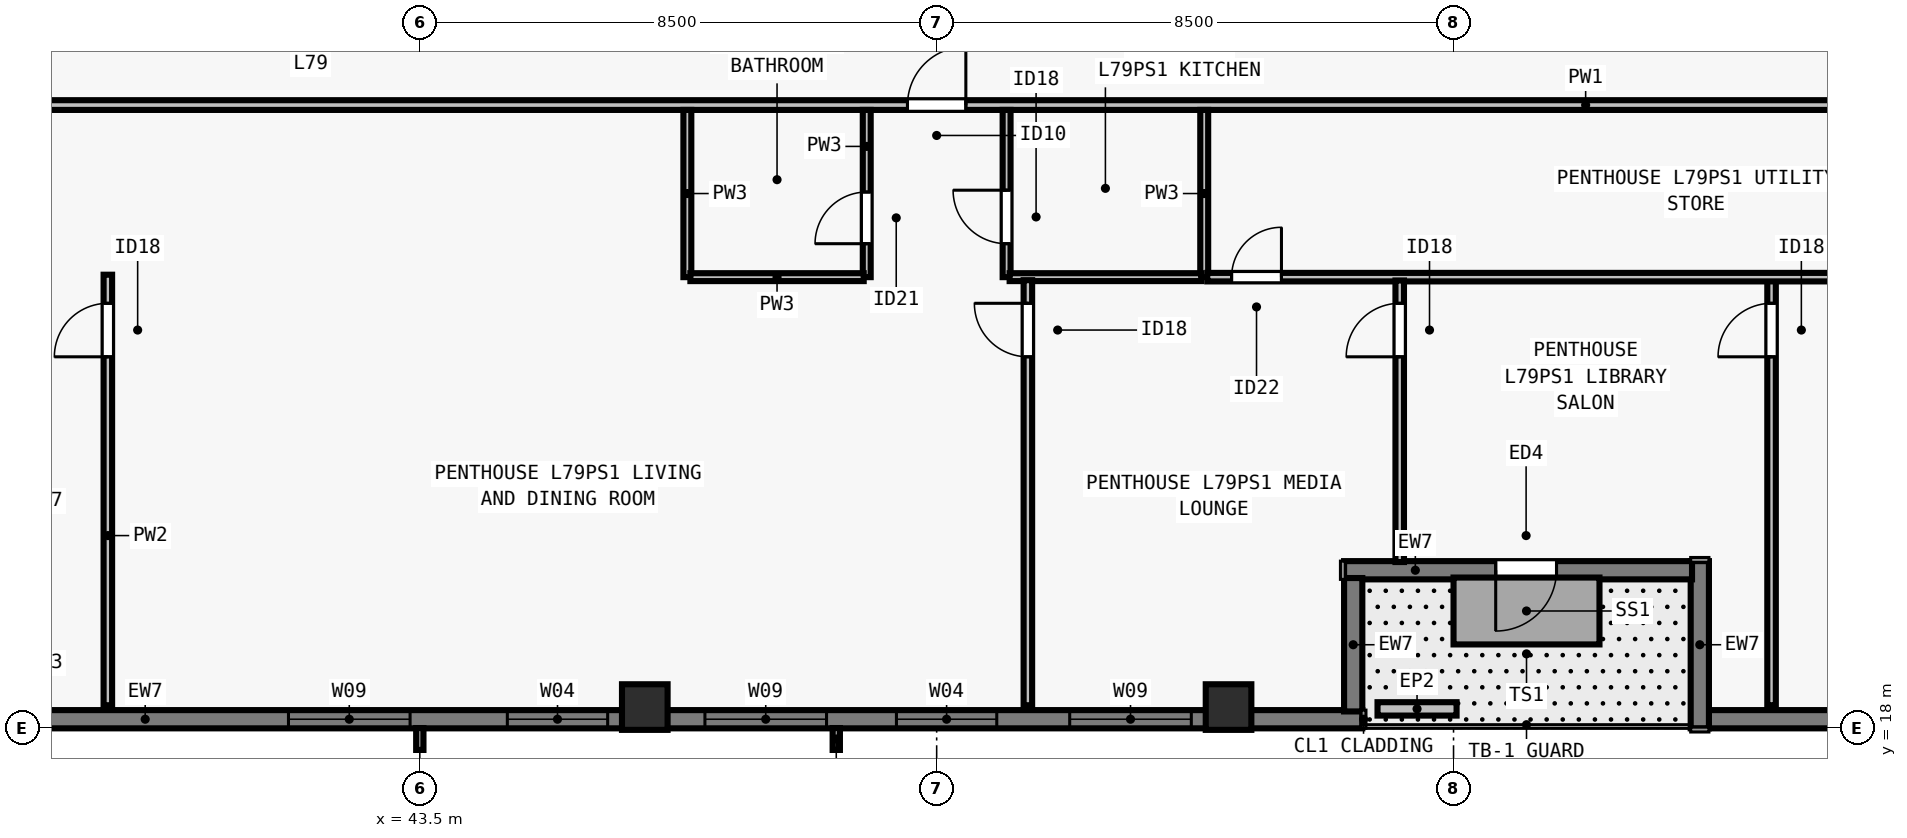
"""IFC4 building model, lengths in metres.
Left out: names, types, materials, properties, quantities, classifications, styles, units other than length and angle.
Written with IfcOpenShell. Run it as: python <this file> out.ifc"""

import sys

from ifc_helpers import new_model, si_unit, direction, frame, frame_2d, origin, origin_2d, place, context, subcontext, project, spatial, rectangle, extrude, element, fill, save


model = new_model("IFC4")
c1 = context("Model", 3, precision=1e-05, world=origin(), true_north=direction((0.0, 1.0)))
c2 = subcontext(c1, "Body", "Model", "MODEL_VIEW")
j1 = project(units=[si_unit("LENGTHUNIT", "METRE"), si_unit("PLANEANGLEUNIT", "RADIAN")], contexts=[c1])
p1 = place(None, origin())
s1 = spatial("IfcSite", under=j1, at=p1, CompositionType="ELEMENT")
p2 = place(p1, origin())
s2 = spatial("IfcBuilding", under=s1, at=p2, CompositionType="ELEMENT")
p3 = place(p2, frame((0.0, 0.0, 287.5)))
s3 = spatial("IfcBuildingStorey", under=s2, at=p3, CompositionType="ELEMENT", Elevation=287.5)
for number, where, z_axis, x_axis in (
    (1, (47.2, 18.35, 0.0), (0.0, 0.0, 1.0), (1.0, 0.0, 0.0)),
    (2, (56.8, 18.35, 0.0), (0.0, 0.0, 1.0), (1.0, 0.0, 0.0)),
):
    element("IfcColumn", number, at=place(p3, frame(where, z_axis=z_axis, x_axis=x_axis)), inside=s3, PredefinedType="COLUMN", context=c2, shape_type="SweptSolid", body=[
        extrude(rectangle(XDim=0.75, YDim=0.75, at=origin_2d()), origin(), (0.0, 0.0, 1.0), 3.5),
    ])
p4 = place(p3, frame((59.0, 18.15, 0.0), z_axis=(0.0, 0.0, 1.0), x_axis=(-1.0, 0.0, 0.0)))
e3 = element("IfcWall", 3, at=p4, inside=s3, PredefinedType="SOLIDWALL", context=c2, shape_type="SweptSolid", body=[
    extrude(rectangle(XDim=22.222, YDim=0.3, at=frame_2d((11.111, 0.0))), origin(), (0.0, 0.0, 1.0), 3.29),
])
p5 = place(p4, frame((2.812, 0.0, 0.8)))
e4 = element("IfcOpeningElement", 4, at=p5, cuts=e3, PredefinedType="OPENING", context=c2, shape_type="SweptSolid", body=[
    extrude(rectangle(XDim=2.0, YDim=1.758, at=frame_2d((1.0, 0.879))), frame((0.0, 0.16, 0.0), z_axis=(0.0, -1.0, 0.0), x_axis=(1.0, 0.0, 0.0)), (0.0, 0.0, 1.0), 0.32),
])
p6 = place(p4, frame((6.012, 0.0, 0.8)))
e5 = element("IfcOpeningElement", 5, at=p6, cuts=e3, PredefinedType="OPENING", context=c2, shape_type="SweptSolid", body=[
    extrude(rectangle(XDim=1.65, YDim=1.758, at=frame_2d((0.825, 0.879))), frame((0.0, 0.16, 0.0), z_axis=(0.0, -1.0, 0.0), x_axis=(1.0, 0.0, 0.0)), (0.0, 0.0, 1.0), 0.32),
])
p7 = place(p4, frame((8.811, 0.0, 0.8)))
e6 = element("IfcOpeningElement", 6, at=p7, cuts=e3, PredefinedType="OPENING", context=c2, shape_type="SweptSolid", body=[
    extrude(rectangle(XDim=2.0, YDim=1.758, at=frame_2d((1.0, 0.879))), frame((0.0, 0.16, 0.0), z_axis=(0.0, -1.0, 0.0), x_axis=(1.0, 0.0, 0.0)), (0.0, 0.0, 1.0), 0.32),
])
p8 = place(p4, frame((12.41, 0.0, 0.8)))
e7 = element("IfcOpeningElement", 7, at=p8, cuts=e3, PredefinedType="OPENING", context=c2, shape_type="SweptSolid", body=[
    extrude(rectangle(XDim=1.65, YDim=1.758, at=frame_2d((0.825, 0.879))), frame((0.0, 0.16, 0.0), z_axis=(0.0, -1.0, 0.0), x_axis=(1.0, 0.0, 0.0)), (0.0, 0.0, 1.0), 0.32),
])
p9 = place(p4, frame((15.66, 0.0, 0.8)))
e8 = element("IfcOpeningElement", 8, at=p9, cuts=e3, PredefinedType="OPENING", context=c2, shape_type="SweptSolid", body=[
    extrude(rectangle(XDim=2.0, YDim=1.758, at=frame_2d((1.0, 0.879))), frame((0.0, 0.16, 0.0), z_axis=(0.0, -1.0, 0.0), x_axis=(1.0, 0.0, 0.0)), (0.0, 0.0, 1.0), 0.32),
])
p10 = place(p3, frame((67.5, 18.15, 0.0), z_axis=(0.0, 0.0, 1.0), x_axis=(-1.0, 0.0, 0.0)))
e9 = element("IfcWall", 9, at=p10, inside=s3, PredefinedType="SOLIDWALL", context=c2, shape_type="SweptSolid", body=[
    extrude(rectangle(XDim=2.822, YDim=0.3, at=frame_2d((1.411, 0.0))), origin(), (0.0, 0.0, 1.0), 3.29),
])
p11 = place(p3, frame((64.55, 18.0, 0.0), z_axis=(0.0, 0.0, 1.0), x_axis=(0.0, 1.0, 0.0)))
e10 = element("IfcWall", 10, at=p11, inside=s3, PredefinedType="SOLIDWALL", context=c2, shape_type="SweptSolid", body=[
    extrude(rectangle(XDim=2.75, YDim=0.3, at=frame_2d((1.375, 0.0))), origin(), (0.0, 0.0, 1.0), 3.29),
])
p12 = place(p3, frame((64.422, 20.6, 0.0), z_axis=(0.0, 0.0, 1.0), x_axis=(-1.0, 0.0, 0.0)))
e11 = element("IfcWall", 11, at=p12, inside=s3, PredefinedType="SOLIDWALL", context=c2, shape_type="SweptSolid", body=[
    extrude(rectangle(XDim=5.722, YDim=0.3, at=frame_2d((2.861, 0.0))), origin(), (0.0, 0.0, 1.0), 3.29),
])
p13 = place(p12, frame((2.229, 0.0, 0.0)))
e12 = element("IfcOpeningElement", 12, at=p13, cuts=e11, PredefinedType="OPENING", context=c2, shape_type="SweptSolid", body=[
    extrude(rectangle(XDim=1.0, YDim=2.15, at=frame_2d((0.5, 1.075))), frame((0.0, 0.16, 0.0), z_axis=(0.0, -1.0, 0.0), x_axis=(1.0, 0.0, 0.0)), (0.0, 0.0, 1.0), 0.32),
])
p14 = place(p3, frame((58.85, 20.472, 0.0), z_axis=(0.0, 0.0, 1.0), x_axis=(0.0, -1.0, 0.0)))
e13 = element("IfcWall", 13, at=p14, inside=s3, PredefinedType="SOLIDWALL", context=c2, shape_type="SweptSolid", body=[
    extrude(rectangle(XDim=2.194, YDim=0.3, at=frame_2d((1.097, 0.0))), origin(), (0.0, 0.0, 1.0), 3.29),
])
p15 = place(p3, frame((59.25, 18.32, 0.0), z_axis=(0.0, 0.0, 1.0), x_axis=(1.0, 0.0, 0.0)))
e14 = element("IfcWall", 14, at=p15, inside=s3, PredefinedType="PARAPET", context=c2, shape_type="SweptSolid", body=[
    extrude(rectangle(XDim=1.3, YDim=0.22, at=frame_2d((0.65, 0.0))), origin(), (0.0, 0.0, 1.0), 0.55),
])
p16 = place(p3, frame((31.285, 28.25, 0.0), z_axis=(0.0, 0.0, 1.0), x_axis=(1.0, 0.0, 0.0)))
e15 = element("IfcWall", 15, at=p16, inside=s3, PredefinedType="PARTITIONING", context=c2, shape_type="SweptSolid", body=[
    extrude(rectangle(XDim=41.43, YDim=0.16, at=frame_2d((20.715, 0.0))), origin(), (0.0, 0.0, 1.0), 3.009),
])
p17 = place(p16, frame((20.235, 0.0, 0.0)))
e16 = element("IfcOpeningElement", 16, at=p17, cuts=e15, PredefinedType="OPENING", context=c2, shape_type="SweptSolid", body=[
    extrude(rectangle(XDim=0.96, YDim=2.18, at=frame_2d((0.48, 1.09))), frame((0.0, 0.09, 0.0), z_axis=(0.0, -1.0, 0.0), x_axis=(1.0, 0.0, 0.0)), (0.0, 0.0, 1.0), 0.18),
])
p18 = place(p3, frame((47.9, 25.42, 0.0), z_axis=(0.0, 0.0, 1.0), x_axis=(0.0, 1.0, 0.0)))
e17 = element("IfcWall", 17, at=p18, inside=s3, PredefinedType="PLUMBINGWALL", context=c2, shape_type="SweptSolid", body=[
    extrude(rectangle(XDim=2.75, YDim=0.13, at=frame_2d((1.375, 0.0))), origin(), (0.0, 0.0, 1.0), 3.29),
])
p19 = place(p3, frame((50.85, 25.42, 0.0), z_axis=(0.0, 0.0, 1.0), x_axis=(0.0, 1.0, 0.0)))
e18 = element("IfcWall", 18, at=p19, inside=s3, PredefinedType="PLUMBINGWALL", context=c2, shape_type="SweptSolid", body=[
    extrude(rectangle(XDim=2.75, YDim=0.13, at=frame_2d((1.375, 0.0))), origin(), (0.0, 0.0, 1.0), 3.29),
])
p20 = place(p19, frame((0.55, 0.0, 0.0)))
e19 = element("IfcOpeningElement", 19, at=p20, cuts=e18, PredefinedType="OPENING", context=c2, shape_type="SweptSolid", body=[
    extrude(rectangle(XDim=0.85, YDim=2.08, at=frame_2d((0.425, 1.04))), frame((0.0, 0.075, 0.0), z_axis=(0.0, -1.0, 0.0), x_axis=(1.0, 0.0, 0.0)), (0.0, 0.0, 1.0), 0.15),
])
p21 = place(p3, frame((47.95, 25.42, 0.0), z_axis=(0.0, 0.0, 1.0), x_axis=(1.0, 0.0, 0.0)))
e20 = element("IfcWall", 20, at=p21, inside=s3, PredefinedType="PLUMBINGWALL", context=c2, shape_type="SweptSolid", body=[
    extrude(rectangle(XDim=2.85, YDim=0.13, at=frame_2d((1.425, 0.0))), origin(), (0.0, 0.0, 1.0), 3.29),
])
p22 = place(p3, frame((56.4, 25.42, 0.0), z_axis=(0.0, 0.0, 1.0), x_axis=(0.0, 1.0, 0.0)))
e21 = element("IfcWall", 21, at=p22, inside=s3, PredefinedType="PLUMBINGWALL", context=c2, shape_type="SweptSolid", body=[
    extrude(rectangle(XDim=2.75, YDim=0.13, at=frame_2d((1.375, 0.0))), origin(), (0.0, 0.0, 1.0), 3.29),
])
p23 = place(p3, frame((53.15, 25.42, 0.0), z_axis=(0.0, 0.0, 1.0), x_axis=(0.0, 1.0, 0.0)))
e22 = element("IfcWall", 22, at=p23, inside=s3, PredefinedType="PLUMBINGWALL", context=c2, shape_type="SweptSolid", body=[
    extrude(rectangle(XDim=2.75, YDim=0.13, at=frame_2d((1.375, 0.0))), origin(), (0.0, 0.0, 1.0), 3.009),
])
p24 = place(p23, frame((0.55, 0.0, 0.0)))
e23 = element("IfcOpeningElement", 23, at=p24, cuts=e22, PredefinedType="OPENING", context=c2, shape_type="SweptSolid", body=[
    extrude(rectangle(XDim=0.88, YDim=2.1, at=frame_2d((0.44, 1.05))), frame((0.0, 0.075, 0.0), z_axis=(0.0, -1.0, 0.0), x_axis=(1.0, 0.0, 0.0)), (0.0, 0.0, 1.0), 0.15),
])
p25 = place(p3, frame((53.2, 25.42, 0.0), z_axis=(0.0, 0.0, 1.0), x_axis=(1.0, 0.0, 0.0)))
e24 = element("IfcWall", 24, at=p25, inside=s3, PredefinedType="PLUMBINGWALL", context=c2, shape_type="SweptSolid", body=[
    extrude(rectangle(XDim=3.15, YDim=0.13, at=frame_2d((1.575, 0.0))), origin(), (0.0, 0.0, 1.0), 3.29),
])
p26 = place(p3, frame((38.37, 18.38, 0.0), z_axis=(0.0, 0.0, 1.0), x_axis=(0.0, 1.0, 0.0)))
e25 = element("IfcWall", 25, at=p26, inside=s3, PredefinedType="PARTITIONING", context=c2, shape_type="SweptSolid", body=[
    extrude(rectangle(XDim=7.08, YDim=0.14, at=frame_2d((3.54, 0.0))), origin(), (0.0, 0.0, 1.0), 2.653),
])
p27 = place(p26, frame((5.73, 0.0, 0.0)))
e26 = element("IfcOpeningElement", 26, at=p27, cuts=e25, PredefinedType="OPENING", context=c2, shape_type="SweptSolid", body=[
    extrude(rectangle(XDim=0.88, YDim=2.1, at=frame_2d((0.44, 1.05))), frame((0.0, 0.08, 0.0), z_axis=(0.0, -1.0, 0.0), x_axis=(1.0, 0.0, 0.0)), (0.0, 0.0, 1.0), 0.16),
])
p28 = place(p3, frame((65.73, 18.38, 0.0), z_axis=(0.0, 0.0, 1.0), x_axis=(0.0, 1.0, 0.0)))
e27 = element("IfcWall", 27, at=p28, inside=s3, PredefinedType="PARTITIONING", context=c2, shape_type="SweptSolid", body=[
    extrude(rectangle(XDim=7.08, YDim=0.14, at=frame_2d((3.54, 0.0))), origin(), (0.0, 0.0, 1.0), 2.653),
])
p29 = place(p28, frame((5.73, 0.0, 0.0)))
e28 = element("IfcOpeningElement", 28, at=p29, cuts=e27, PredefinedType="OPENING", context=c2, shape_type="SweptSolid", body=[
    extrude(rectangle(XDim=0.88, YDim=2.1, at=frame_2d((0.44, 1.05))), frame((0.0, 0.08, 0.0), z_axis=(0.0, -1.0, 0.0), x_axis=(1.0, 0.0, 0.0)), (0.0, 0.0, 1.0), 0.16),
])
p30 = place(p3, frame((56.45, 25.42, 0.0), z_axis=(0.0, 0.0, 1.0), x_axis=(1.0, 0.0, 0.0)))
e29 = element("IfcWall", 29, at=p30, inside=s3, PredefinedType="PARTITIONING", context=c2, shape_type="SweptSolid", body=[
    extrude(rectangle(XDim=16.18, YDim=0.14, at=frame_2d((8.09, 0.0))), origin(), (0.0, 0.0, 1.0), 3.009),
])
p31 = place(p30, frame((0.4, 0.0, 0.0)))
e30 = element("IfcOpeningElement", 30, at=p31, cuts=e29, PredefinedType="OPENING", context=c2, shape_type="SweptSolid", body=[
    extrude(rectangle(XDim=0.82, YDim=2.1, at=frame_2d((0.41, 1.05))), frame((0.0, 0.08, 0.0), z_axis=(0.0, -1.0, 0.0), x_axis=(1.0, 0.0, 0.0)), (0.0, 0.0, 1.0), 0.16),
])
p32 = place(p3, frame((53.5, 18.38, 0.0), z_axis=(0.0, 0.0, 1.0), x_axis=(0.0, 1.0, 0.0)))
e31 = element("IfcWall", 31, at=p32, inside=s3, PredefinedType="PARTITIONING", context=c2, shape_type="SweptSolid", body=[
    extrude(rectangle(XDim=6.99, YDim=0.14, at=frame_2d((3.495, 0.0))), origin(), (0.0, 0.0, 1.0), 3.29),
])
p33 = place(p32, frame((5.73, 0.0, 0.0)))
e32 = element("IfcOpeningElement", 32, at=p33, cuts=e31, PredefinedType="OPENING", context=c2, shape_type="SweptSolid", body=[
    extrude(rectangle(XDim=0.88, YDim=2.1, at=frame_2d((0.44, 1.05))), frame((0.0, 0.08, 0.0), z_axis=(0.0, -1.0, 0.0), x_axis=(1.0, 0.0, 0.0)), (0.0, 0.0, 1.0), 0.16),
])
p34 = place(p3, frame((59.615, 20.735, 0.0), z_axis=(0.0, 0.0, 1.0), x_axis=(0.0, 1.0, 0.0)))
e33 = element("IfcWall", 33, at=p34, inside=s3, PredefinedType="PARTITIONING", context=c2, shape_type="SweptSolid", body=[
    extrude(rectangle(XDim=4.63, YDim=0.14, at=frame_2d((2.315, 0.0))), origin(), (0.0, 0.0, 1.0), 3.29),
])
p35 = place(p34, frame((3.375, 0.0, 0.0)))
e34 = element("IfcOpeningElement", 34, at=p35, cuts=e33, PredefinedType="OPENING", context=c2, shape_type="SweptSolid", body=[
    extrude(rectangle(XDim=0.88, YDim=2.1, at=frame_2d((0.44, 1.05))), frame((0.0, 0.08, 0.0), z_axis=(0.0, -1.0, 0.0), x_axis=(1.0, 0.0, 0.0)), (0.0, 0.0, 1.0), 0.16),
])
p36 = place(p5, origin())
e35 = element("IfcWindow", 35, at=p36, inside=s3, PartitioningType="SINGLE_PANEL", PredefinedType="WINDOW", context=c2, shape_type="SweptSolid", body=[
    extrude(rectangle(XDim=2.0, YDim=1.758, at=frame_2d((1.0, 0.879))), frame((0.0, -0.05, 0.0), z_axis=(0.0, -1.0, 0.0), x_axis=(1.0, 0.0, 0.0)), (0.0, 0.0, 1.0), 0.06),
])
fill(e4, e35)
p37 = place(p6, origin())
e36 = element("IfcWindow", 36, at=p37, inside=s3, PartitioningType="SINGLE_PANEL", PredefinedType="WINDOW", context=c2, shape_type="SweptSolid", body=[
    extrude(rectangle(XDim=1.65, YDim=1.758, at=frame_2d((0.825, 0.879))), frame((0.0, -0.05, 0.0), z_axis=(0.0, -1.0, 0.0), x_axis=(1.0, 0.0, 0.0)), (0.0, 0.0, 1.0), 0.06),
])
fill(e5, e36)
p38 = place(p7, origin())
e37 = element("IfcWindow", 37, at=p38, inside=s3, PartitioningType="SINGLE_PANEL", PredefinedType="WINDOW", context=c2, shape_type="SweptSolid", body=[
    extrude(rectangle(XDim=2.0, YDim=1.758, at=frame_2d((1.0, 0.879))), frame((0.0, -0.05, 0.0), z_axis=(0.0, -1.0, 0.0), x_axis=(1.0, 0.0, 0.0)), (0.0, 0.0, 1.0), 0.06),
])
fill(e6, e37)
p39 = place(p8, origin())
e38 = element("IfcWindow", 38, at=p39, inside=s3, PartitioningType="SINGLE_PANEL", PredefinedType="WINDOW", context=c2, shape_type="SweptSolid", body=[
    extrude(rectangle(XDim=1.65, YDim=1.758, at=frame_2d((0.825, 0.879))), frame((0.0, -0.05, 0.0), z_axis=(0.0, -1.0, 0.0), x_axis=(1.0, 0.0, 0.0)), (0.0, 0.0, 1.0), 0.06),
])
fill(e7, e38)
p40 = place(p9, origin())
e39 = element("IfcWindow", 39, at=p40, inside=s3, PartitioningType="SINGLE_PANEL", PredefinedType="WINDOW", context=c2, shape_type="SweptSolid", body=[
    extrude(rectangle(XDim=2.0, YDim=1.758, at=frame_2d((1.0, 0.879))), frame((0.0, -0.05, 0.0), z_axis=(0.0, -1.0, 0.0), x_axis=(1.0, 0.0, 0.0)), (0.0, 0.0, 1.0), 0.06),
])
fill(e8, e39)
p41 = place(p13, origin())
e40 = element("IfcDoor", 40, at=p41, inside=s3, OperationType="SINGLE_SWING_RIGHT", PredefinedType="DOOR", context=c2, shape_type="SweptSolid", body=[
    extrude(rectangle(XDim=1.0, YDim=2.15, at=frame_2d((0.5, 1.075))), frame((0.0, 0.025, 0.0), z_axis=(0.0, -1.0, 0.0), x_axis=(1.0, 0.0, 0.0)), (0.0, 0.0, 1.0), 0.05),
])
fill(e12, e40)
p42 = place(p20, origin())
e41 = element("IfcDoor", 41, at=p42, inside=s3, OperationType="SINGLE_SWING_LEFT", PredefinedType="DOOR", context=c2, shape_type="SweptSolid", body=[
    extrude(rectangle(XDim=0.85, YDim=2.08, at=frame_2d((0.425, 1.04))), frame((0.0, 0.025, 0.0), z_axis=(0.0, -1.0, 0.0), x_axis=(1.0, 0.0, 0.0)), (0.0, 0.0, 1.0), 0.05),
])
fill(e19, e41)
p43 = place(p24, origin())
e42 = element("IfcDoor", 42, at=p43, inside=s3, OperationType="SINGLE_SWING_RIGHT", PredefinedType="DOOR", context=c2, shape_type="SweptSolid", body=[
    extrude(rectangle(XDim=0.88, YDim=2.1, at=frame_2d((0.44, 1.05))), frame((0.0, 0.025, 0.0), z_axis=(0.0, -1.0, 0.0), x_axis=(1.0, 0.0, 0.0)), (0.0, 0.0, 1.0), 0.05),
])
fill(e23, e42)
p44 = place(p27, origin())
e43 = element("IfcDoor", 43, at=p44, inside=s3, OperationType="SINGLE_SWING_LEFT", PredefinedType="DOOR", context=c2, shape_type="SweptSolid", body=[
    extrude(rectangle(XDim=0.88, YDim=2.1, at=frame_2d((0.44, 1.05))), frame((0.0, 0.025, 0.0), z_axis=(0.0, -1.0, 0.0), x_axis=(1.0, 0.0, 0.0)), (0.0, 0.0, 1.0), 0.05),
])
fill(e26, e43)
p45 = place(p31, origin())
e44 = element("IfcDoor", 44, at=p45, inside=s3, OperationType="SINGLE_SWING_RIGHT", PredefinedType="DOOR", context=c2, shape_type="SweptSolid", body=[
    extrude(rectangle(XDim=0.82, YDim=2.1, at=frame_2d((0.41, 1.05))), frame((0.0, 0.025, 0.0), z_axis=(0.0, -1.0, 0.0), x_axis=(1.0, 0.0, 0.0)), (0.0, 0.0, 1.0), 0.05),
])
fill(e30, e44)
p46 = place(p29, origin())
e45 = element("IfcDoor", 45, at=p46, inside=s3, OperationType="SINGLE_SWING_LEFT", PredefinedType="DOOR", context=c2, shape_type="SweptSolid", body=[
    extrude(rectangle(XDim=0.88, YDim=2.1, at=frame_2d((0.44, 1.05))), frame((0.0, 0.025, 0.0), z_axis=(0.0, -1.0, 0.0), x_axis=(1.0, 0.0, 0.0)), (0.0, 0.0, 1.0), 0.05),
])
fill(e28, e45)
p47 = place(p33, origin())
e46 = element("IfcDoor", 46, at=p47, inside=s3, OperationType="SINGLE_SWING_RIGHT", PredefinedType="DOOR", context=c2, shape_type="SweptSolid", body=[
    extrude(rectangle(XDim=0.88, YDim=2.1, at=frame_2d((0.44, 1.05))), frame((0.0, 0.025, 0.0), z_axis=(0.0, -1.0, 0.0), x_axis=(1.0, 0.0, 0.0)), (0.0, 0.0, 1.0), 0.05),
])
fill(e32, e46)
p48 = place(p35, origin())
e47 = element("IfcDoor", 47, at=p48, inside=s3, OperationType="SINGLE_SWING_LEFT", PredefinedType="DOOR", context=c2, shape_type="SweptSolid", body=[
    extrude(rectangle(XDim=0.88, YDim=2.1, at=frame_2d((0.44, 1.05))), frame((0.0, 0.025, 0.0), z_axis=(0.0, -1.0, 0.0), x_axis=(1.0, 0.0, 0.0)), (0.0, 0.0, 1.0), 0.05),
])
fill(e34, e47)
p49 = place(p17, origin())
e48 = element("IfcDoor", 48, at=p49, inside=s3, OperationType="SINGLE_SWING_RIGHT", PredefinedType="DOOR", context=c2, shape_type="SweptSolid", body=[
    extrude(rectangle(XDim=0.96, YDim=2.18, at=frame_2d((0.48, 1.09))), frame((0.0, 0.025, 0.0), z_axis=(0.0, -1.0, 0.0), x_axis=(1.0, 0.0, 0.0)), (0.0, 0.0, 1.0), 0.05),
])
fill(e16, e48)
save(model, sys.argv[1])
